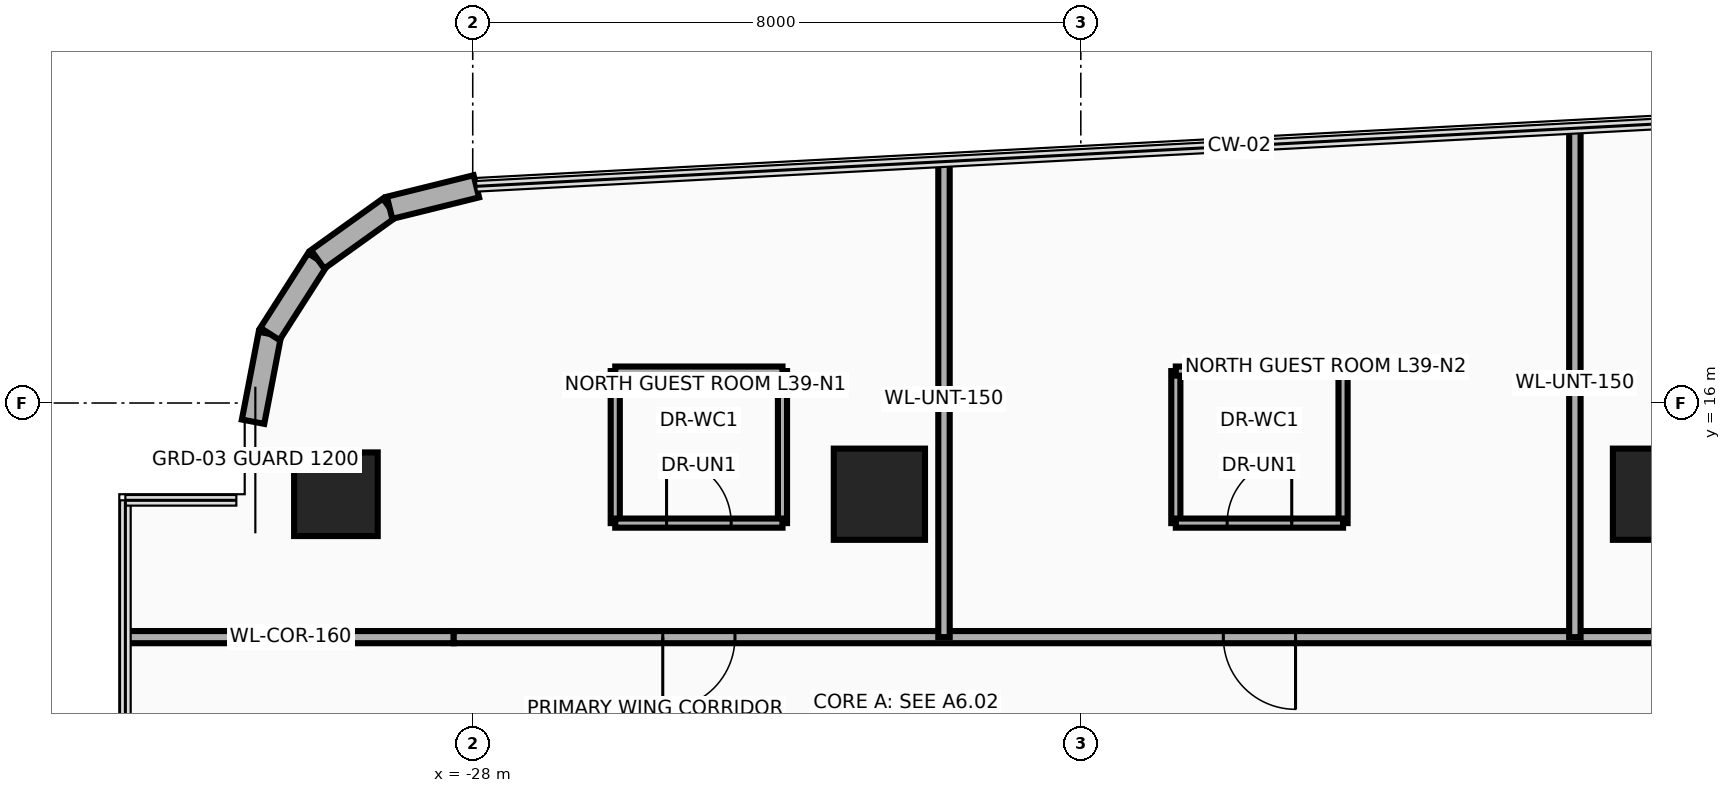
"""IFC4 building model, lengths in metres.
Left out: names, types, materials, properties, quantities, classifications, styles, units other than length and angle.
Written with IfcOpenShell. Run it as: python <this file> out.ifc"""

import sys

from ifc_helpers import new_model, si_unit, direction, frame, frame_2d, origin, origin_2d, place, context, subcontext, project, spatial, rectangle, circle, extrude, source, transform, mapped, element, fill, save


model = new_model("IFC4")
c1 = context("Model", 3, precision=1e-05, world=origin(), true_north=direction((0.0, 1.0)))
c2 = subcontext(c1, "Body", "Model", "MODEL_VIEW")
j1 = project(units=[si_unit("LENGTHUNIT", "METRE"), si_unit("PLANEANGLEUNIT", "RADIAN")], contexts=[c1])
p1 = place(None, origin())
s1 = spatial("IfcSite", under=j1, at=p1, CompositionType="ELEMENT")
p2 = place(p1, origin())
s2 = spatial("IfcBuilding", under=s1, at=p2, CompositionType="ELEMENT")
p3 = place(p2, frame((0.0, 0.0, 153.8)))
s3 = spatial("IfcBuildingStorey", under=s2, at=p3, CompositionType="ELEMENT", Elevation=153.8)
m1 = source(origin(), c2, "Body", "SweptSolid", [
    extrude(circle(Radius=0.55, at=origin_2d()), origin(), (0.0, 0.0, 1.0), 3.7),
])
p4 = place(p3, frame((-29.8, 14.8, 0.0), z_axis=(0.0, 0.0, 1.0), x_axis=(1.0, 0.0, 0.0)))
e1 = element("IfcColumn", 1, at=p4, inside=s3, PredefinedType="COLUMN", context=c2, shape_type="MappedRepresentation", body=[
    mapped(m1, transform((0.0, 0.0, 0.0), x_axis=(1.0, 0.0, 0.0), y_axis=(0.0, 1.0, 0.0), z_axis=(0.0, 0.0, 1.0), scale=1.0)),
])
m2 = source(origin(), c2, "Body", "SweptSolid", [
    extrude(rectangle(XDim=1.2, YDim=1.2, at=origin_2d()), origin(), (0.0, 0.0, 1.0), 3.7),
])
for number, where, z_axis, x_axis in (
    (2, (-22.65, 14.8, 0.0), (0.0, 0.0, 1.0), (1.0, 0.0, 0.0)),
    (3, (-12.4, 14.8, 0.0), (0.0, 0.0, 1.0), (1.0, 0.0, 0.0)),
):
    element("IfcColumn", number, at=place(p3, frame(where, z_axis=z_axis, x_axis=x_axis)), inside=s3, PredefinedType="COLUMN", context=c2, shape_type="MappedRepresentation", body=[
        mapped(m2, transform((0.0, 0.0, 0.0), x_axis=(1.0, 0.0, 0.0), y_axis=(0.0, 1.0, 0.0), z_axis=(0.0, 0.0, 1.0), scale=1.0)),
    ])
p5 = place(p3, frame((-30.89, 15.754, 0.0), z_axis=(0.0, 0.0, 1.0), x_axis=(0.188562397879, 0.982061210977, 0.0)))
e4 = element("IfcWall", 4, at=p5, inside=s3, PredefinedType="SOLIDWALL", context=c2, shape_type="SweptSolid", body=[
    extrude(rectangle(XDim=1.176, YDim=0.3, at=frame_2d((0.588, 0.0))), origin(), (0.0, 0.0, 1.0), 3.46),
])
for number, where, z_axis, x_axis in (
    (5, (-30.668, 16.909, 0.0), (0.0, 0.0, 1.0), (0.539, 0.842, 0.0)),
    (6, (-30.04, 17.89, 0.0), (0.0, 0.0, 1.0), (0.813, 0.583, 0.0)),
):
    element("IfcWall", number, at=place(p3, frame(where, z_axis=z_axis, x_axis=x_axis)), inside=s3, PredefinedType="SOLIDWALL", context=c2, shape_type="SweptSolid", body=[
        extrude(rectangle(XDim=1.165, YDim=0.3, at=frame_2d((0.583, 0.0))), origin(), (0.0, 0.0, 1.0), 3.46),
    ])
p6 = place(p3, frame((-29.094, 18.569, 0.0), z_axis=(0.0, 0.0, 1.0), x_axis=(0.970762249107, 0.24004302887, 0.0)))
e7 = element("IfcWall", 7, at=p6, inside=s3, PredefinedType="SOLIDWALL", context=c2, shape_type="SweptSolid", body=[
    extrude(rectangle(XDim=1.176, YDim=0.3, at=frame_2d((0.588, 0.0))), origin(), (0.0, 0.0, 1.0), 3.46),
])
p7 = place(p3, frame((-32.54, 12.92, 0.0), z_axis=(0.0, 0.0, 1.0), x_axis=(1.0, 0.0, 0.0)))
e8 = element("IfcWall", 8, at=p7, inside=s3, PredefinedType="PARTITIONING", context=c2, shape_type="SweptSolid", body=[
    extrude(rectangle(XDim=4.29, YDim=0.16, at=frame_2d((2.145, 0.0))), origin(), (0.0, 0.0, 1.0), 2.896),
])
p8 = place(p3, frame((-28.25, 12.92, 0.0), z_axis=(0.0, 0.0, 1.0), x_axis=(1.0, 0.0, 0.0)))
e9 = element("IfcWall", 9, at=p8, inside=s3, PredefinedType="PARTITIONING", context=c2, shape_type="SweptSolid", body=[
    extrude(rectangle(XDim=23.64, YDim=0.16, at=frame_2d((11.82, 0.0))), origin(), (0.0, 0.0, 1.0), 2.834),
])
p9 = place(p8, frame((2.75, 0.0, 0.0)))
e10 = element("IfcOpeningElement", 10, at=p9, cuts=e9, PredefinedType="OPENING", context=c2, shape_type="SweptSolid", body=[
    extrude(rectangle(XDim=0.95, YDim=2.15, at=frame_2d((0.475, 1.075))), frame((0.0, 0.095, 0.0), z_axis=(0.0, -1.0, 0.0), x_axis=(1.0, 0.0, 0.0)), (0.0, 0.0, 1.0), 0.19),
])
p10 = place(p8, frame((10.125, 0.0, 0.0)))
e11 = element("IfcOpeningElement", 11, at=p10, cuts=e9, PredefinedType="OPENING", context=c2, shape_type="SweptSolid", body=[
    extrude(rectangle(XDim=0.95, YDim=2.15, at=frame_2d((0.475, 1.075))), frame((0.0, 0.095, 0.0), z_axis=(0.0, -1.0, 0.0), x_axis=(1.0, 0.0, 0.0)), (0.0, 0.0, 1.0), 0.19),
])
p11 = place(p8, frame((17.62, 0.0, 0.0)))
e12 = element("IfcOpeningElement", 12, at=p11, cuts=e9, PredefinedType="OPENING", context=c2, shape_type="SweptSolid", body=[
    extrude(rectangle(XDim=0.95, YDim=2.15, at=frame_2d((0.475, 1.075))), frame((0.0, 0.095, 0.0), z_axis=(0.0, -1.0, 0.0), x_axis=(1.0, 0.0, 0.0)), (0.0, 0.0, 1.0), 0.19),
])
p12 = place(p3, frame((-21.8, 12.92, 0.0), z_axis=(0.0, 0.0, 1.0), x_axis=(0.0, 1.0, 0.0)))
e13 = element("IfcWall", 13, at=p12, inside=s3, PredefinedType="PARTITIONING", context=c2, shape_type="SweptSolid", body=[
    extrude(rectangle(XDim=6.256, YDim=0.15, at=frame_2d((3.128, 0.0))), origin(), (0.0, 0.0, 1.0), 2.666),
])
p13 = place(p3, frame((-13.5, 12.92, 0.0), z_axis=(0.0, 0.0, 1.0), x_axis=(0.0, 1.0, 0.0)))
e14 = element("IfcWall", 14, at=p13, inside=s3, PredefinedType="PARTITIONING", context=c2, shape_type="SweptSolid", body=[
    extrude(rectangle(XDim=6.694, YDim=0.15, at=frame_2d((3.347, 0.0))), origin(), (0.0, 0.0, 1.0), 2.666),
])
for number, where, z_axis, x_axis in (
    (15, (-26.125, 14.42, 0.0), (0.0, 0.0, 1.0), (0.0, 1.0, 0.0)),
    (16, (-23.925, 14.42, 0.0), (0.0, 0.0, 1.0), (0.0, 1.0, 0.0)),
):
    element("IfcWall", number, at=place(p3, frame(where, z_axis=z_axis, x_axis=x_axis)), inside=s3, PredefinedType="PARTITIONING", context=c2, shape_type="SweptSolid", body=[
        extrude(rectangle(XDim=2.0, YDim=0.12, at=frame_2d((1.0, 0.0))), origin(), (0.0, 0.0, 1.0), 2.666),
    ])
p14 = place(p3, frame((-26.125, 16.42, 0.0), z_axis=(0.0, 0.0, 1.0), x_axis=(1.0, 0.0, 0.0)))
e17 = element("IfcWall", 17, at=p14, inside=s3, PredefinedType="PARTITIONING", context=c2, shape_type="SweptSolid", body=[
    extrude(rectangle(XDim=2.2, YDim=0.12, at=frame_2d((1.1, 0.0))), origin(), (0.0, 0.0, 1.0), 3.46),
])
p15 = place(p3, frame((-26.125, 14.42, 0.0), z_axis=(0.0, 0.0, 1.0), x_axis=(1.0, 0.0, 0.0)))
e18 = element("IfcWall", 18, at=p15, inside=s3, PredefinedType="PARTITIONING", context=c2, shape_type="SweptSolid", body=[
    extrude(rectangle(XDim=2.2, YDim=0.12, at=frame_2d((1.1, 0.0))), origin(), (0.0, 0.0, 1.0), 3.46),
])
p16 = place(p15, frame((0.675, 0.0, 0.0)))
e19 = element("IfcOpeningElement", 19, at=p16, cuts=e18, PredefinedType="OPENING", context=c2, shape_type="SweptSolid", body=[
    extrude(rectangle(XDim=0.85, YDim=2.1, at=frame_2d((0.425, 1.05))), frame((0.0, 0.075, 0.0), z_axis=(0.0, -1.0, 0.0), x_axis=(1.0, 0.0, 0.0)), (0.0, 0.0, 1.0), 0.15),
])
for number, where, z_axis, x_axis in (
    (20, (-18.75, 14.42, 0.0), (0.0, 0.0, 1.0), (0.0, 1.0, 0.0)),
    (21, (-16.55, 14.42, 0.0), (0.0, 0.0, 1.0), (0.0, 1.0, 0.0)),
):
    element("IfcWall", number, at=place(p3, frame(where, z_axis=z_axis, x_axis=x_axis)), inside=s3, PredefinedType="PARTITIONING", context=c2, shape_type="SweptSolid", body=[
        extrude(rectangle(XDim=2.0, YDim=0.12, at=frame_2d((1.0, 0.0))), origin(), (0.0, 0.0, 1.0), 2.666),
    ])
p17 = place(p3, frame((-18.75, 16.42, 0.0), z_axis=(0.0, 0.0, 1.0), x_axis=(1.0, 0.0, 0.0)))
e22 = element("IfcWall", 22, at=p17, inside=s3, PredefinedType="PARTITIONING", context=c2, shape_type="SweptSolid", body=[
    extrude(rectangle(XDim=2.2, YDim=0.12, at=frame_2d((1.1, 0.0))), origin(), (0.0, 0.0, 1.0), 3.46),
])
p18 = place(p3, frame((-18.75, 14.42, 0.0), z_axis=(0.0, 0.0, 1.0), x_axis=(1.0, 0.0, 0.0)))
e23 = element("IfcWall", 23, at=p18, inside=s3, PredefinedType="PARTITIONING", context=c2, shape_type="SweptSolid", body=[
    extrude(rectangle(XDim=2.2, YDim=0.12, at=frame_2d((1.1, 0.0))), origin(), (0.0, 0.0, 1.0), 3.46),
])
p19 = place(p18, frame((0.675, 0.0, 0.0)))
e24 = element("IfcOpeningElement", 24, at=p19, cuts=e23, PredefinedType="OPENING", context=c2, shape_type="SweptSolid", body=[
    extrude(rectangle(XDim=0.85, YDim=2.1, at=frame_2d((0.425, 1.05))), frame((0.0, 0.075, 0.0), z_axis=(0.0, -1.0, 0.0), x_axis=(1.0, 0.0, 0.0)), (0.0, 0.0, 1.0), 0.15),
])
p20 = place(p9, frame((0.95, 0.0, 0.0), z_axis=(0.0, 0.0, 1.0), x_axis=(-1.0, 0.0, 0.0)))
e25 = element("IfcDoor", 25, at=p20, inside=s3, OperationType="SINGLE_SWING_LEFT", PredefinedType="DOOR", context=c2, shape_type="SweptSolid", body=[
    extrude(rectangle(XDim=0.95, YDim=2.15, at=frame_2d((0.475, 1.075))), frame((0.0, 0.025, 0.0), z_axis=(0.0, -1.0, 0.0), x_axis=(1.0, 0.0, 0.0)), (0.0, 0.0, 1.0), 0.05),
])
fill(e10, e25)
p21 = place(p16, origin())
e26 = element("IfcDoor", 26, at=p21, inside=s3, OperationType="SINGLE_SWING_RIGHT", PredefinedType="DOOR", context=c2, shape_type="SweptSolid", body=[
    extrude(rectangle(XDim=0.85, YDim=2.1, at=frame_2d((0.425, 1.05))), frame((0.0, 0.025, 0.0), z_axis=(0.0, -1.0, 0.0), x_axis=(1.0, 0.0, 0.0)), (0.0, 0.0, 1.0), 0.05),
])
fill(e19, e26)
p22 = place(p10, frame((0.95, 0.0, 0.0), z_axis=(0.0, 0.0, 1.0), x_axis=(-1.0, 0.0, 0.0)))
e27 = element("IfcDoor", 27, at=p22, inside=s3, OperationType="SINGLE_SWING_LEFT", PredefinedType="DOOR", context=c2, shape_type="SweptSolid", body=[
    extrude(rectangle(XDim=0.95, YDim=2.15, at=frame_2d((0.475, 1.075))), frame((0.0, 0.025, 0.0), z_axis=(0.0, -1.0, 0.0), x_axis=(1.0, 0.0, 0.0)), (0.0, 0.0, 1.0), 0.05),
])
fill(e11, e27)
p23 = place(p19, origin())
e28 = element("IfcDoor", 28, at=p23, inside=s3, OperationType="SINGLE_SWING_RIGHT", PredefinedType="DOOR", context=c2, shape_type="SweptSolid", body=[
    extrude(rectangle(XDim=0.85, YDim=2.1, at=frame_2d((0.425, 1.05))), frame((0.0, 0.025, 0.0), z_axis=(0.0, -1.0, 0.0), x_axis=(1.0, 0.0, 0.0)), (0.0, 0.0, 1.0), 0.05),
])
fill(e24, e28)
save(model, sys.argv[1])
